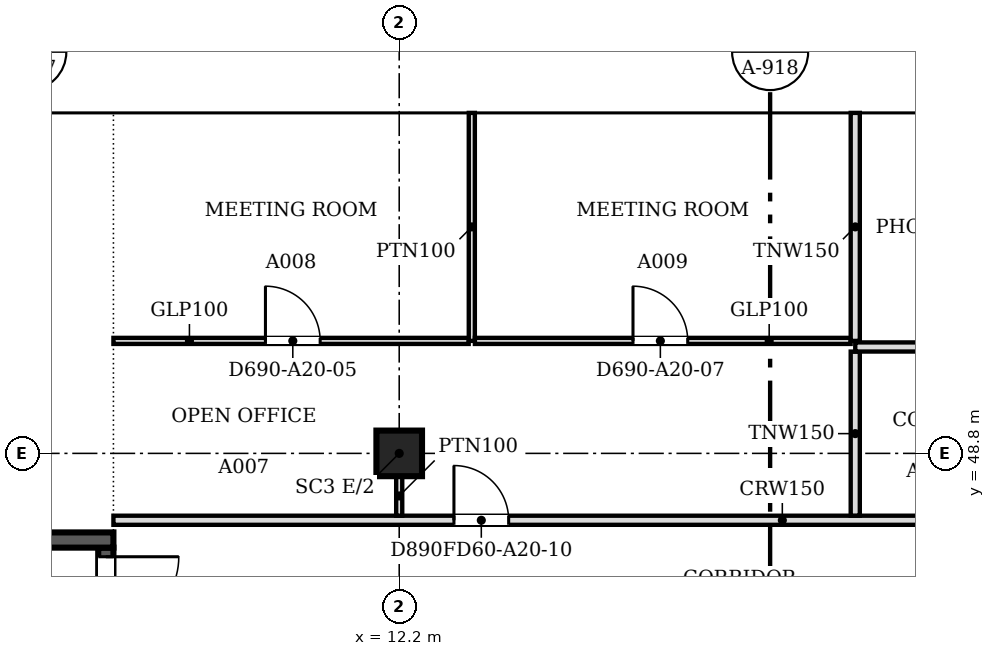
"""IFC4 building model, lengths in metres.
Left out: names, types, materials, properties, quantities, classifications, styles, units other than length and angle.
Written with IfcOpenShell. Run it as: python <this file> out.ifc"""

import sys

from ifc_helpers import new_model, si_unit, direction, frame, frame_2d, origin, origin_2d, place, context, subcontext, project, spatial, polyline, rectangle, outline, extrude, faceted_brep, source, transform, mapped, element, fill, save


model = new_model("IFC4")
c1 = context("Model", 3, precision=1e-05, world=origin(), true_north=direction((0.0, 1.0)))
c2 = subcontext(c1, "Body", "Model", "MODEL_VIEW")
j1 = project(units=[si_unit("LENGTHUNIT", "METRE"), si_unit("PLANEANGLEUNIT", "RADIAN")], contexts=[c1])
p1 = place(None, origin())
s1 = spatial("IfcSite", under=j1, at=p1, CompositionType="ELEMENT")
p2 = place(p1, origin())
s2 = spatial("IfcBuilding", under=s1, at=p2, CompositionType="ELEMENT")
p3 = place(p2, frame((0.0, 0.0, 228.3)))
s3 = spatial("IfcBuildingStorey", under=s2, at=p3, CompositionType="ELEMENT", Elevation=228.3)
p4 = place(p3, frame((12.2, 48.8, 0.0), z_axis=(0.0, 0.0, 1.0), x_axis=(1.0, 0.0, 0.0)))
e1 = element("IfcColumn", 1, at=p4, inside=s3, PredefinedType="COLUMN", context=c2, shape_type="SweptSolid", body=[
    extrude(rectangle(XDim=0.75, YDim=0.75, at=origin_2d()), origin(), (0.0, 0.0, 1.0), 3.5),
])
m1 = source(origin(), c2, "Body", "SweptSolid", [
    extrude(outline(polyline([(3.05, 0.0), (6.1, 3.8), (3.05, 7.6), (0.0, 3.8), (3.05, 0.0)])), frame((0.0, 0.25, 0.0), z_axis=(0.0, -1.0, 0.0), x_axis=(1.0, 0.0, 0.0)), (0.0, 0.0, 1.0), 0.5),
])
p5 = place(p3, frame((21.35, 54.65, -3.8), z_axis=(0.0, 0.0, 1.0), x_axis=(-1.0, 0.0, 0.0)))
e2 = element("IfcWall", 2, at=p5, inside=s3, PredefinedType="SOLIDWALL", context=c2, shape_type="MappedRepresentation", body=[
    mapped(m1, transform((0.0, 0.0, 0.0), scale=1.0)),
])
m2 = source(origin(), c2, "Body", "SweptSolid", [
    extrude(outline(polyline([(3.05, 0.399), (5.78, 3.8), (3.05, 7.201), (0.321, 3.8), (3.05, 0.399)])), frame((0.0, 0.26, 0.0), z_axis=(0.0, -1.0, 0.0), x_axis=(1.0, 0.0, 0.0)), (0.0, 0.0, 1.0), 0.52),
])
p6 = place(p5, origin())
e3 = element("IfcOpeningElement", 3, at=p6, cuts=e2, PredefinedType="OPENING", context=c2, shape_type="MappedRepresentation", body=[
    mapped(m2, transform((0.0, 0.0, 0.0), scale=1.0)),
])
p7 = place(p3, frame((15.25, 54.65, -3.8), z_axis=(0.0, 0.0, 1.0), x_axis=(-1.0, 0.0, 0.0)))
e4 = element("IfcWall", 4, at=p7, inside=s3, PredefinedType="SOLIDWALL", context=c2, shape_type="MappedRepresentation", body=[
    mapped(m1, transform((0.0, 0.0, 0.0), scale=1.0)),
])
p8 = place(p7, origin())
e5 = element("IfcOpeningElement", 5, at=p8, cuts=e4, PredefinedType="OPENING", context=c2, shape_type="MappedRepresentation", body=[
    mapped(m2, transform((0.0, 0.0, 0.0), scale=1.0)),
])
m3 = source(origin(), c2, "Body", "Brep", [
    faceted_brep([(3.003, -0.25, 0.0), (3.05, -0.25, 0.06), (3.05, -0.25, 7.54), (3.003, -0.25, 7.6), (0.0, -0.25, 3.8), (0.0, 0.25, 3.8), (2.957, 0.25, 7.541), (2.957, 0.25, 0.059), (3.003, 0.0, 0.0), (3.003, 0.0, 7.6)], [[[0, 1, 2, 3, 4]], [[5, 6, 7]], [[1, 0, 8]], [[9, 3, 2]], [[6, 5, 4, 3, 9]], [[5, 7, 8, 0, 4]], [[1, 8, 7, 6, 9, 2]]]),
])
p9 = place(p3, frame((9.15, 54.65, -3.8), z_axis=(0.0, 0.0, 1.0), x_axis=(-1.0, 0.0, 0.0)))
e6 = element("IfcWall", 6, at=p9, inside=s3, PredefinedType="SOLIDWALL", context=c2, shape_type="MappedRepresentation", body=[
    mapped(m3, transform((0.0, 0.0, 0.0), scale=1.0)),
])
m4 = source(origin(), c2, "Body", "SweptSolid", [
    extrude(outline(polyline([(2.803, 6.944), (0.319, 3.8), (2.803, 0.656), (2.803, 6.944)])), frame((0.0, 0.26, 0.0), z_axis=(0.0, -1.0, 0.0), x_axis=(1.0, 0.0, 0.0)), (0.0, 0.0, 1.0), 0.52),
])
p10 = place(p9, origin())
e7 = element("IfcOpeningElement", 7, at=p10, cuts=e6, PredefinedType="OPENING", context=c2, shape_type="MappedRepresentation", body=[
    mapped(m4, transform((0.0, 0.0, 0.0), scale=1.0)),
])
m5 = source(origin(), c2, "Body", "Brep", [
    faceted_brep([(3.05, -0.25, 0.0), (6.1, -0.25, 3.8), (6.1, -0.25, 3.8), (0.0, -0.25, 3.8), (0.0, 0.25, 3.8), (6.1, 0.25, 3.8), (6.1, 0.25, 3.8), (3.05, 0.25, 0.0)], [[[0, 1, 2, 3]], [[4, 5, 6, 7]], [[7, 6, 1, 0]], [[5, 4, 3, 2]], [[4, 7, 0, 3]], [[1, 6, 5, 2]]]),
])
p11 = place(p3, frame((24.4, 54.65, 0.0), z_axis=(0.0, 0.0, 1.0), x_axis=(-1.0, 0.0, 0.0)))
e8 = element("IfcWall", 8, at=p11, inside=s3, PredefinedType="SOLIDWALL", context=c2, shape_type="MappedRepresentation", body=[
    mapped(m5, transform((0.0, 0.0, 0.0), scale=1.0)),
])
m6 = source(origin(), c2, "Body", "SweptSolid", [
    extrude(outline(polyline([(3.05, 0.399), (5.579, 3.55), (0.521, 3.55), (3.05, 0.399)])), frame((0.0, 0.26, 0.0), z_axis=(0.0, -1.0, 0.0), x_axis=(1.0, 0.0, 0.0)), (0.0, 0.0, 1.0), 0.52),
])
p12 = place(p11, origin())
e9 = element("IfcOpeningElement", 9, at=p12, cuts=e8, PredefinedType="OPENING", context=c2, shape_type="MappedRepresentation", body=[
    mapped(m6, transform((0.0, 0.0, 0.0), scale=1.0)),
])
m7 = source(origin(), c2, "Body", "SweptSolid", [
    extrude(outline(polyline([(3.05, 0.0), (6.1, 3.8), (0.0, 3.8), (3.05, 0.0)])), frame((0.0, 0.25, 0.0), z_axis=(0.0, -1.0, 0.0), x_axis=(1.0, 0.0, 0.0)), (0.0, 0.0, 1.0), 0.5),
])
p13 = place(p3, frame((18.3, 54.65, 0.0), z_axis=(0.0, 0.0, 1.0), x_axis=(-1.0, 0.0, 0.0)))
e10 = element("IfcWall", 10, at=p13, inside=s3, PredefinedType="SOLIDWALL", context=c2, shape_type="MappedRepresentation", body=[
    mapped(m7, transform((0.0, 0.0, 0.0), scale=1.0)),
])
p14 = place(p13, origin())
e11 = element("IfcOpeningElement", 11, at=p14, cuts=e10, PredefinedType="OPENING", context=c2, shape_type="MappedRepresentation", body=[
    mapped(m6, transform((0.0, 0.0, 0.0), scale=1.0)),
])
m8 = source(origin(), c2, "Body", "Brep", [
    faceted_brep([(3.05, -0.25, 0.0), (6.053, -0.25, 3.8), (0.0, -0.25, 3.8), (0.0, 0.25, 3.8), (6.007, 0.25, 3.8), (6.007, 0.25, 3.741), (3.05, 0.25, 0.0), (6.053, 0.0, 3.8)], [[[0, 1, 2]], [[3, 4, 5, 6]], [[6, 5, 7, 1, 0]], [[4, 3, 2, 1, 7]], [[3, 6, 0, 2]], [[5, 4, 7]]]),
])
p15 = place(p3, frame((12.2, 54.65, 0.0), z_axis=(0.0, 0.0, 1.0), x_axis=(-1.0, 0.0, 0.0)))
e12 = element("IfcWall", 12, at=p15, inside=s3, PredefinedType="SOLIDWALL", context=c2, shape_type="MappedRepresentation", body=[
    mapped(m8, transform((0.0, 0.0, 0.0), scale=1.0)),
])
m9 = source(origin(), c2, "Body", "SweptSolid", [
    extrude(outline(polyline([(3.049, 0.401), (5.537, 3.55), (0.521, 3.55), (3.049, 0.401)])), frame((0.0, 0.26, 0.0), z_axis=(0.0, -1.0, 0.0), x_axis=(1.0, 0.0, 0.0)), (0.0, 0.0, 1.0), 0.52),
])
p16 = place(p15, origin())
e13 = element("IfcOpeningElement", 13, at=p16, cuts=e12, PredefinedType="OPENING", context=c2, shape_type="MappedRepresentation", body=[
    mapped(m9, transform((0.0, 0.0, 0.0), scale=1.0)),
])
p17 = place(p3, frame((3.6, 47.375, 0.0), z_axis=(0.0, 0.0, 1.0), x_axis=(1.0, 0.0, 0.0)))
e14 = element("IfcWall", 14, at=p17, inside=s3, PredefinedType="SOLIDWALL", context=c2, shape_type="SweptSolid", body=[
    extrude(rectangle(XDim=3.9, YDim=0.25, at=frame_2d((1.95, 0.0))), origin(), (0.0, 0.0, 1.0), 3.8),
])
p18 = place(p3, frame((7.375, 47.25, 0.0), z_axis=(0.0, 0.0, 1.0), x_axis=(0.0, -1.0, 0.0)))
e15 = element("IfcWall", 15, at=p18, inside=s3, PredefinedType="SOLIDWALL", context=c2, shape_type="SweptSolid", body=[
    extrude(rectangle(XDim=8.0, YDim=0.25, at=frame_2d((4.0, 0.0))), origin(), (0.0, 0.0, 1.0), 3.8),
])
m10 = source(origin(), c2, "Body", "SweptSolid", [
    extrude(rectangle(XDim=1.2, YDim=2.1, at=frame_2d((0.6, 1.05))), frame((0.0, 0.135, 0.0), z_axis=(0.0, -1.0, 0.0), x_axis=(1.0, 0.0, 0.0)), (0.0, 0.0, 1.0), 0.27),
])
p19 = place(p18, frame((0.15, 0.0, 0.0)))
e16 = element("IfcOpeningElement", 16, at=p19, cuts=e15, PredefinedType="OPENING", context=c2, shape_type="MappedRepresentation", body=[
    mapped(m10, transform((0.0, 0.0, 0.0), scale=1.0)),
])
p20 = place(p3, frame((7.5, 47.7, 0.0), z_axis=(0.0, 0.0, 1.0), x_axis=(1.0, 0.0, 0.0)))
e17 = element("IfcWall", 17, at=p20, inside=s3, PredefinedType="PARTITIONING", context=c2, shape_type="SweptSolid", body=[
    extrude(rectangle(XDim=20.6, YDim=0.15, at=frame_2d((10.3, 0.0))), origin(), (0.0, 0.0, 1.0), 2.888),
])
m11 = source(origin(), c2, "Body", "SweptSolid", [
    extrude(rectangle(XDim=1.0, YDim=2.1, at=frame_2d((0.5, 1.05))), frame((0.0, 0.085, 0.0), z_axis=(0.0, -1.0, 0.0), x_axis=(1.0, 0.0, 0.0)), (0.0, 0.0, 1.0), 0.17),
])
p21 = place(p20, frame((15.501, 0.0, 0.0)))
e18 = element("IfcOpeningElement", 18, at=p21, cuts=e17, PredefinedType="OPENING", context=c2, shape_type="MappedRepresentation", body=[
    mapped(m11, transform((0.0, 0.0, 0.0), scale=1.0)),
])
m12 = source(origin(), c2, "Body", "SweptSolid", [
    extrude(rectangle(XDim=0.9, YDim=2.1, at=frame_2d((0.45, 1.05))), frame((0.0, 0.085, 0.0), z_axis=(0.0, -1.0, 0.0), x_axis=(1.0, 0.0, 0.0)), (0.0, 0.0, 1.0), 0.17),
])
p22 = place(p20, frame((5.6, 0.0, 0.0)))
e19 = element("IfcOpeningElement", 19, at=p22, cuts=e17, PredefinedType="OPENING", context=c2, shape_type="MappedRepresentation", body=[
    mapped(m12, transform((0.0, 0.0, 0.0), scale=1.0)),
])
p23 = place(p3, frame((19.7, 47.776, 0.0), z_axis=(0.0, 0.0, 1.0), x_axis=(0.0, 1.0, 0.0)))
e20 = element("IfcWall", 20, at=p23, inside=s3, PredefinedType="PARTITIONING", context=c2, shape_type="SweptSolid", body=[
    extrude(rectangle(XDim=2.698, YDim=0.15, at=frame_2d((1.349, 0.0))), origin(), (0.0, 0.0, 1.0), 2.888),
])
p24 = place(p3, frame((12.2, 48.425, 0.0), z_axis=(0.0, 0.0, 1.0), x_axis=(0.0, -1.0, 0.0)))
e21 = element("IfcWall", 21, at=p24, inside=s3, PredefinedType="PARTITIONING", context=c2, shape_type="SweptSolid", body=[
    extrude(rectangle(XDim=0.65, YDim=0.1, at=frame_2d((0.325, 0.0))), origin(), (0.0, 0.0, 1.0), 2.888),
])
p25 = place(p3, frame((19.7, 50.55, 0.0), z_axis=(0.0, 0.0, 1.0), x_axis=(1.0, 0.0, 0.0)))
e22 = element("IfcWall", 22, at=p25, inside=s3, PredefinedType="PARTITIONING", context=c2, shape_type="SweptSolid", body=[
    extrude(rectangle(XDim=8.324, YDim=0.15, at=frame_2d((4.162, 0.0))), origin(), (0.0, 0.0, 1.0), 2.888),
])
p26 = place(p25, frame((1.6, 0.0, 0.0)))
e23 = element("IfcOpeningElement", 23, at=p26, cuts=e22, PredefinedType="OPENING", context=c2, shape_type="MappedRepresentation", body=[
    mapped(m12, transform((0.0, 0.0, 0.0), scale=1.0)),
])
p27 = place(p25, frame((5.758, 0.0, 0.0)))
e24 = element("IfcOpeningElement", 24, at=p27, cuts=e22, PredefinedType="OPENING", context=c2, shape_type="MappedRepresentation", body=[
    mapped(m12, transform((0.0, 0.0, 0.0), scale=1.0)),
])
p28 = place(p3, frame((7.5, 50.65, 0.0), z_axis=(0.0, 0.0, 1.0), x_axis=(1.0, 0.0, 0.0)))
e25 = element("IfcWall", 25, at=p28, inside=s3, PredefinedType="PARTITIONING", context=c2, shape_type="SweptSolid", body=[
    extrude(rectangle(XDim=5.843, YDim=0.1, at=frame_2d((2.921, 0.0))), origin(), (0.0, 0.0, 1.0), 2.888),
])
m13 = source(origin(), c2, "Body", "SweptSolid", [
    extrude(rectangle(XDim=0.9, YDim=2.1, at=frame_2d((0.45, 1.05))), frame((0.0, 0.06, 0.0), z_axis=(0.0, -1.0, 0.0), x_axis=(1.0, 0.0, 0.0)), (0.0, 0.0, 1.0), 0.12),
])
p29 = place(p28, frame((2.5, 0.0, 0.0)))
e26 = element("IfcOpeningElement", 26, at=p29, cuts=e25, PredefinedType="OPENING", context=c2, shape_type="MappedRepresentation", body=[
    mapped(m13, transform((0.0, 0.0, 0.0), scale=1.0)),
])
p30 = place(p3, frame((13.394, 50.65, 0.0), z_axis=(0.0, 0.0, 1.0), x_axis=(0.0, 1.0, 0.0)))
e27 = element("IfcWall", 27, at=p30, inside=s3, PredefinedType="PARTITIONING", context=c2, shape_type="SweptSolid", body=[
    extrude(rectangle(XDim=3.75, YDim=0.1, at=frame_2d((1.875, 0.0))), origin(), (0.0, 0.0, 1.0), 2.888),
])
p31 = place(p3, frame((13.445, 50.65, 0.0), z_axis=(0.0, 0.0, 1.0), x_axis=(1.0, 0.0, 0.0)))
e28 = element("IfcWall", 28, at=p31, inside=s3, PredefinedType="PARTITIONING", context=c2, shape_type="SweptSolid", body=[
    extrude(rectangle(XDim=6.179, YDim=0.1, at=frame_2d((3.09, 0.0))), origin(), (0.0, 0.0, 1.0), 2.888),
])
p32 = place(p31, frame((2.6, 0.0, 0.0)))
e29 = element("IfcOpeningElement", 29, at=p32, cuts=e28, PredefinedType="OPENING", context=c2, shape_type="MappedRepresentation", body=[
    mapped(m13, transform((0.0, 0.0, 0.0), scale=1.0)),
])
p33 = place(p3, frame((19.7, 50.65, 0.0), z_axis=(0.0, 0.0, 1.0), x_axis=(0.0, 1.0, 0.0)))
e30 = element("IfcWall", 30, at=p33, inside=s3, PredefinedType="PARTITIONING", context=c2, shape_type="SweptSolid", body=[
    extrude(rectangle(XDim=3.75, YDim=0.15, at=frame_2d((1.875, 0.0))), origin(), (0.0, 0.0, 1.0), 2.888),
])
m14 = source(origin(), c2, "Body", "SweptSolid", [
    extrude(rectangle(XDim=1.2, YDim=2.1, at=frame_2d((0.6, 1.05))), frame((0.0, 0.025, 0.0), z_axis=(0.0, -1.0, 0.0), x_axis=(1.0, 0.0, 0.0)), (0.0, 0.0, 1.0), 0.05),
])
p34 = place(p19, origin())
e31 = element("IfcDoor", 31, at=p34, inside=s3, OperationType="SINGLE_SWING_LEFT", PredefinedType="DOOR", context=c2, shape_type="MappedRepresentation", body=[
    mapped(m14, transform((0.0, 0.0, 0.0), scale=1.0)),
])
fill(e16, e31)
m15 = source(origin(), c2, "Body", "SweptSolid", [
    extrude(rectangle(XDim=0.9, YDim=2.1, at=frame_2d((0.45, 1.05))), frame((0.0, 0.025, 0.0), z_axis=(0.0, -1.0, 0.0), x_axis=(1.0, 0.0, 0.0)), (0.0, 0.0, 1.0), 0.05),
])
p35 = place(p29, origin())
e32 = element("IfcDoor", 32, at=p35, inside=s3, OperationType="SINGLE_SWING_LEFT", PredefinedType="DOOR", context=c2, shape_type="MappedRepresentation", body=[
    mapped(m15, transform((0.0, 0.0, 0.0), scale=1.0)),
])
fill(e26, e32)
p36 = place(p32, origin())
e33 = element("IfcDoor", 33, at=p36, inside=s3, OperationType="SINGLE_SWING_LEFT", PredefinedType="DOOR", context=c2, shape_type="MappedRepresentation", body=[
    mapped(m15, transform((0.0, 0.0, 0.0), scale=1.0)),
])
fill(e29, e33)
p37 = place(p22, origin())
e34 = element("IfcDoor", 34, at=p37, inside=s3, OperationType="SINGLE_SWING_LEFT", PredefinedType="DOOR", context=c2, shape_type="MappedRepresentation", body=[
    mapped(m15, transform((0.0, 0.0, 0.0), scale=1.0)),
])
fill(e19, e34)
save(model, sys.argv[1])
